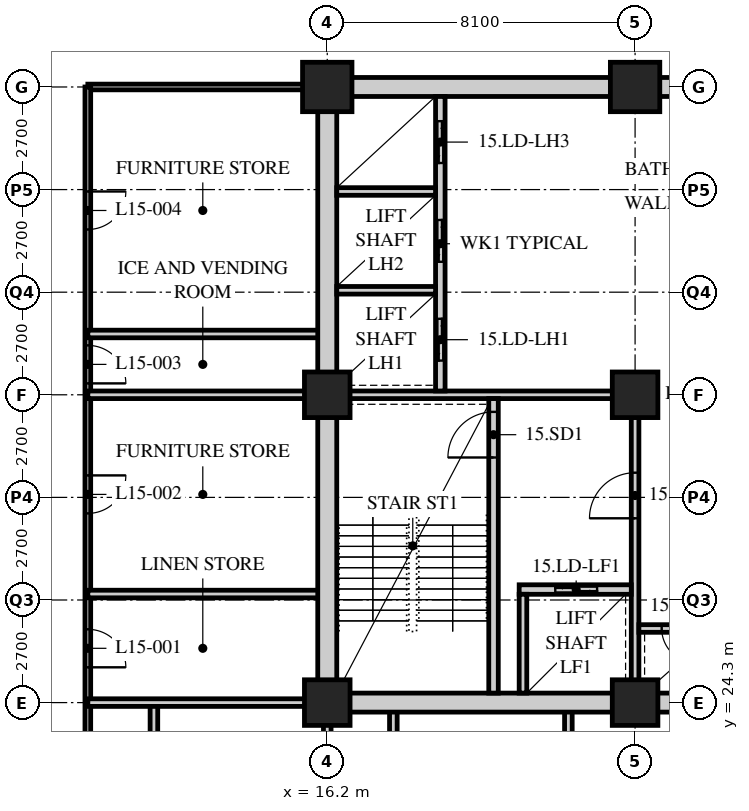
"""IFC4 building model, lengths in metres.
Left out: names, types, materials, properties, quantities, classifications, styles, units other than length and angle.
Written with IfcOpenShell. Run it as: python <this file> out.ifc"""

import sys

from ifc_helpers import new_model, si_unit, direction, frame, frame_2d, origin, origin_2d, place, context, subcontext, project, spatial, rectangle, hollow_rectangle, extrude, element, fill, save


model = new_model("IFC4")
c1 = context("Model", 3, precision=1e-05, world=origin(), true_north=direction((0.0, 1.0)))
c2 = subcontext(c1, "Body", "Model", "MODEL_VIEW")
j1 = project(units=[si_unit("LENGTHUNIT", "METRE"), si_unit("PLANEANGLEUNIT", "RADIAN")], contexts=[c1])
p1 = place(None, origin())
s1 = spatial("IfcSite", under=j1, at=p1, CompositionType="ELEMENT")
p2 = place(p1, origin())
s2 = spatial("IfcBuilding", under=s1, at=p2, CompositionType="ELEMENT")
p3 = place(p2, frame((0.0, 0.0, 63.6)))
s3 = spatial("IfcBuildingStorey", under=s2, at=p3, CompositionType="ELEMENT", Elevation=63.6)
for number, where, z_axis, x_axis in (
    (1, (16.2, 24.3, 0.0), (0.0, 0.0, 1.0), (1.0, 0.0, 0.0)),
    (2, (16.2, 32.4, 0.0), (0.0, 0.0, 1.0), (1.0, 0.0, 0.0)),
):
    element("IfcColumn", number, at=place(p3, frame(where, z_axis=z_axis, x_axis=x_axis)), inside=s3, PredefinedType="COLUMN", context=c2, shape_type="SweptSolid", body=[
        extrude(hollow_rectangle(XDim=1.2, YDim=1.2, WallThickness=0.12, at=origin_2d()), origin(), (0.0, 0.0, 1.0), 3.4),
    ])
p4 = place(p3, frame((16.2, 40.5, 0.0), z_axis=(0.0, 0.0, 1.0), x_axis=(1.0, 0.0, 0.0)))
e3 = element("IfcColumn", 3, at=p4, inside=s3, PredefinedType="COLUMN", context=c2, shape_type="SweptSolid", body=[
    extrude(hollow_rectangle(XDim=1.3, YDim=1.3, WallThickness=0.13, at=origin_2d()), origin(), (0.0, 0.0, 1.0), 3.4),
])
for number, where, z_axis, x_axis in (
    (4, (24.3, 24.3, 0.0), (0.0, 0.0, 1.0), (1.0, 0.0, 0.0)),
    (5, (24.3, 32.4, 0.0), (0.0, 0.0, 1.0), (1.0, 0.0, 0.0)),
):
    element("IfcColumn", number, at=place(p3, frame(where, z_axis=z_axis, x_axis=x_axis)), inside=s3, PredefinedType="COLUMN", context=c2, shape_type="SweptSolid", body=[
        extrude(hollow_rectangle(XDim=1.2, YDim=1.2, WallThickness=0.12, at=origin_2d()), origin(), (0.0, 0.0, 1.0), 3.4),
    ])
p5 = place(p3, frame((24.3, 40.5, 0.0), z_axis=(0.0, 0.0, 1.0), x_axis=(1.0, 0.0, 0.0)))
e6 = element("IfcColumn", 6, at=p5, inside=s3, PredefinedType="COLUMN", context=c2, shape_type="SweptSolid", body=[
    extrude(hollow_rectangle(XDim=1.3, YDim=1.3, WallThickness=0.13, at=origin_2d()), origin(), (0.0, 0.0, 1.0), 3.4),
])
p6 = place(p3, frame((16.0, 40.5, 0.0), z_axis=(0.0, 0.0, 1.0), x_axis=(-1.0, 0.0, 0.0)))
e7 = element("IfcWall", 7, at=p6, inside=s3, PredefinedType="PARTITIONING", context=c2, shape_type="SweptSolid", body=[
    extrude(rectangle(XDim=6.1, YDim=0.15, at=frame_2d((3.05, 0.0))), origin(), (0.0, 0.0, 1.0), 2.578),
])
p7 = place(p3, frame((9.9, 40.5, 0.0), z_axis=(0.0, 0.0, 1.0), x_axis=(0.0, -1.0, 0.0)))
e8 = element("IfcWall", 8, at=p7, inside=s3, PredefinedType="PARTITIONING", context=c2, shape_type="SweptSolid", body=[
    extrude(rectangle(XDim=26.55, YDim=0.15, at=frame_2d((13.275, 0.0))), origin(), (0.0, 0.0, 1.0), 3.19),
])
p8 = place(p7, frame((14.271, 0.0, 0.0)))
e9 = element("IfcOpeningElement", 9, at=p8, cuts=e8, PredefinedType="OPENING", context=c2, shape_type="SweptSolid", body=[
    extrude(rectangle(XDim=1.0, YDim=2.1, at=frame_2d((0.5, 1.05))), frame((0.0, 0.085, 0.0), z_axis=(0.0, -1.0, 0.0), x_axis=(1.0, 0.0, 0.0)), (0.0, 0.0, 1.0), 0.17),
])
p9 = place(p7, frame((10.221, 0.0, 0.0)))
e10 = element("IfcOpeningElement", 10, at=p9, cuts=e8, PredefinedType="OPENING", context=c2, shape_type="SweptSolid", body=[
    extrude(rectangle(XDim=1.0, YDim=2.1, at=frame_2d((0.5, 1.05))), frame((0.0, 0.085, 0.0), z_axis=(0.0, -1.0, 0.0), x_axis=(1.0, 0.0, 0.0)), (0.0, 0.0, 1.0), 0.17),
])
p10 = place(p7, frame((6.8, 0.0, 0.0)))
e11 = element("IfcOpeningElement", 11, at=p10, cuts=e8, PredefinedType="OPENING", context=c2, shape_type="SweptSolid", body=[
    extrude(rectangle(XDim=1.0, YDim=2.1, at=frame_2d((0.5, 1.05))), frame((0.0, 0.085, 0.0), z_axis=(0.0, -1.0, 0.0), x_axis=(1.0, 0.0, 0.0)), (0.0, 0.0, 1.0), 0.17),
])
p11 = place(p7, frame((2.75, 0.0, 0.0)))
e12 = element("IfcOpeningElement", 12, at=p11, cuts=e8, PredefinedType="OPENING", context=c2, shape_type="SweptSolid", body=[
    extrude(rectangle(XDim=1.0, YDim=2.1, at=frame_2d((0.5, 1.05))), frame((0.0, 0.085, 0.0), z_axis=(0.0, -1.0, 0.0), x_axis=(1.0, 0.0, 0.0)), (0.0, 0.0, 1.0), 0.17),
])
p12 = place(p3, frame((9.9, 32.4, 0.0), z_axis=(0.0, 0.0, 1.0), x_axis=(1.0, 0.0, 0.0)))
e13 = element("IfcWall", 13, at=p12, inside=s3, PredefinedType="SOLIDWALL", context=c2, shape_type="SweptSolid", body=[
    extrude(rectangle(XDim=6.3, YDim=0.2, at=frame_2d((3.15, 0.0))), origin(), (0.0, 0.0, 1.0), 2.578),
])
for number, where, z_axis, x_axis in (
    (14, (9.9, 27.157, 0.0), (0.0, 0.0, 1.0), (1.0, 0.0, 0.0)),
    (15, (9.9, 34.0, 0.0), (0.0, 0.0, 1.0), (1.0, 0.0, 0.0)),
):
    element("IfcWall", number, at=place(p3, frame(where, z_axis=z_axis, x_axis=x_axis)), inside=s3, PredefinedType="SOLIDWALL", context=c2, shape_type="SweptSolid", body=[
        extrude(rectangle(XDim=6.3, YDim=0.2, at=frame_2d((3.15, 0.0))), origin(), (0.0, 0.0, 1.0), 3.19),
    ])
p13 = place(p3, frame((16.2, 13.95, 0.0), z_axis=(0.0, 0.0, 1.0), x_axis=(0.0, 1.0, 0.0)))
e16 = element("IfcWall", 16, at=p13, inside=s3, PredefinedType="SOLIDWALL", context=c2, shape_type="SweptSolid", body=[
    extrude(rectangle(XDim=10.35, YDim=0.2, at=frame_2d((5.175, 0.0))), origin(), (0.0, 0.0, 1.0), 2.578),
])
for number, where, z_axis, x_axis in (
    (17, (11.639, 13.95, 0.0), (0.0, 0.0, 1.0), (0.0, 1.0, 0.0)),
    (18, (17.939, 13.95, 0.0), (0.0, 0.0, 1.0), (0.0, 1.0, 0.0)),
    (19, (22.545, 13.95, 0.0), (0.0, 0.0, 1.0), (0.0, 1.0, 0.0)),
):
    element("IfcWall", number, at=place(p3, frame(where, z_axis=z_axis, x_axis=x_axis)), inside=s3, PredefinedType="SOLIDWALL", context=c2, shape_type="SweptSolid", body=[
        extrude(rectangle(XDim=10.35, YDim=0.2, at=frame_2d((5.175, 0.0))), origin(), (0.0, 0.0, 1.0), 3.19),
    ])
p14 = place(p3, frame((9.9, 24.3, 0.0), z_axis=(0.0, 0.0, 1.0), x_axis=(1.0, 0.0, 0.0)))
e20 = element("IfcWall", 20, at=p14, inside=s3, PredefinedType="SOLIDWALL", context=c2, shape_type="SweptSolid", body=[
    extrude(rectangle(XDim=6.3, YDim=0.2, at=frame_2d((3.15, 0.0))), origin(), (0.0, 0.0, 1.0), 2.578),
])
p15 = place(p3, frame((15.95, 24.3, 0.0), z_axis=(0.0, 0.0, 1.0), x_axis=(1.0, 0.0, 0.0)))
e21 = element("IfcWall", 21, at=p15, inside=s3, PredefinedType="SOLIDWALL", context=c2, shape_type="SweptSolid", body=[
    extrude(rectangle(XDim=24.8, YDim=0.5, at=frame_2d((12.4, 0.0))), origin(), (0.0, 0.0, 1.0), 2.54),
])
p16 = place(p15, frame((11.5, 0.0, 0.0)))
e22 = element("IfcOpeningElement", 22, at=p16, cuts=e21, PredefinedType="OPENING", context=c2, shape_type="SweptSolid", body=[
    extrude(rectangle(XDim=1.8, YDim=2.4, at=frame_2d((0.9, 1.2))), frame((0.0, 0.26, 0.0), z_axis=(0.0, -1.0, 0.0), x_axis=(1.0, 0.0, 0.0)), (0.0, 0.0, 1.0), 0.52),
])
p17 = place(p3, frame((15.95, 40.5, 0.0), z_axis=(0.0, 0.0, 1.0), x_axis=(1.0, 0.0, 0.0)))
e23 = element("IfcWall", 23, at=p17, inside=s3, PredefinedType="SOLIDWALL", context=c2, shape_type="SweptSolid", body=[
    extrude(rectangle(XDim=24.8, YDim=0.5, at=frame_2d((12.4, 0.0))), origin(), (0.0, 0.0, 1.0), 2.54),
])
p18 = place(p17, frame((11.5, 0.0, 0.0)))
e24 = element("IfcOpeningElement", 24, at=p18, cuts=e23, PredefinedType="OPENING", context=c2, shape_type="SweptSolid", body=[
    extrude(rectangle(XDim=1.8, YDim=2.4, at=frame_2d((0.9, 1.2))), frame((0.0, 0.26, 0.0), z_axis=(0.0, -1.0, 0.0), x_axis=(1.0, 0.0, 0.0)), (0.0, 0.0, 1.0), 0.52),
])
p19 = place(p3, frame((16.2, 24.55, 0.0), z_axis=(0.0, 0.0, 1.0), x_axis=(0.0, 1.0, 0.0)))
e25 = element("IfcWall", 25, at=p19, inside=s3, PredefinedType="SOLIDWALL", context=c2, shape_type="SweptSolid", body=[
    extrude(rectangle(XDim=15.7, YDim=0.5, at=frame_2d((7.85, 0.0))), origin(), (0.0, 0.0, 1.0), 2.578),
])
p20 = place(p3, frame((16.45, 32.4, 0.0), z_axis=(0.0, 0.0, 1.0), x_axis=(1.0, 0.0, 0.0)))
e26 = element("IfcWall", 26, at=p20, inside=s3, PredefinedType="SOLIDWALL", context=c2, shape_type="SweptSolid", body=[
    extrude(rectangle(XDim=7.95, YDim=0.2, at=frame_2d((3.975, 0.0))), origin(), (0.0, 0.0, 1.0), 2.578),
])
p21 = place(p3, frame((24.3, 24.55, 0.0), z_axis=(0.0, 0.0, 1.0), x_axis=(0.0, 1.0, 0.0)))
e27 = element("IfcWall", 27, at=p21, inside=s3, PredefinedType="SOLIDWALL", context=c2, shape_type="SweptSolid", body=[
    extrude(rectangle(XDim=7.75, YDim=0.2, at=frame_2d((3.875, 0.0))), origin(), (0.0, 0.0, 1.0), 2.578),
])
p22 = place(p21, frame((4.6, 0.0, 0.0)))
e28 = element("IfcOpeningElement", 28, at=p22, cuts=e27, PredefinedType="OPENING", context=c2, shape_type="SweptSolid", body=[
    extrude(rectangle(XDim=1.2, YDim=2.1, at=frame_2d((0.6, 1.05))), frame((0.0, 0.11, 0.0), z_axis=(0.0, -1.0, 0.0), x_axis=(1.0, 0.0, 0.0)), (0.0, 0.0, 1.0), 0.22),
])
p23 = place(p3, frame((20.575, 24.55, 0.0), z_axis=(0.0, 0.0, 1.0), x_axis=(0.0, 1.0, 0.0)))
e29 = element("IfcWall", 29, at=p23, inside=s3, PredefinedType="SOLIDWALL", context=c2, shape_type="SweptSolid", body=[
    extrude(rectangle(XDim=7.75, YDim=0.25, at=frame_2d((3.875, 0.0))), origin(), (0.0, 0.0, 1.0), 3.19),
])
p24 = place(p23, frame((6.2, 0.0, 0.0)))
e30 = element("IfcOpeningElement", 30, at=p24, cuts=e29, PredefinedType="OPENING", context=c2, shape_type="SweptSolid", body=[
    extrude(rectangle(XDim=1.2, YDim=2.1, at=frame_2d((0.6, 1.05))), frame((0.0, 0.135, 0.0), z_axis=(0.0, -1.0, 0.0), x_axis=(1.0, 0.0, 0.0)), (0.0, 0.0, 1.0), 0.27),
])
p25 = place(p3, frame((21.25, 27.275, 0.0), z_axis=(0.0, 0.0, 1.0), x_axis=(1.0, 0.0, 0.0)))
e31 = element("IfcWall", 31, at=p25, inside=s3, PredefinedType="SOLIDWALL", context=c2, shape_type="SweptSolid", body=[
    extrude(rectangle(XDim=2.95, YDim=0.25, at=frame_2d((1.475, 0.0))), origin(), (0.0, 0.0, 1.0), 3.19),
])
p26 = place(p25, frame((0.95, 0.0, 0.0)))
e32 = element("IfcOpeningElement", 32, at=p26, cuts=e31, PredefinedType="OPENING", context=c2, shape_type="SweptSolid", body=[
    extrude(rectangle(XDim=1.1, YDim=2.4, at=frame_2d((0.55, 1.2))), frame((0.0, 0.135, 0.0), z_axis=(0.0, -1.0, 0.0), x_axis=(1.0, 0.0, 0.0)), (0.0, 0.0, 1.0), 0.27),
])
p27 = place(p3, frame((21.35, 24.55, 0.0), z_axis=(0.0, 0.0, 1.0), x_axis=(0.0, 1.0, 0.0)))
e33 = element("IfcWall", 33, at=p27, inside=s3, PredefinedType="SOLIDWALL", context=c2, shape_type="SweptSolid", body=[
    extrude(rectangle(XDim=2.6, YDim=0.2, at=frame_2d((1.3, 0.0))), origin(), (0.0, 0.0, 1.0), 3.19),
])
p28 = place(p3, frame((19.175, 32.5, 0.0), z_axis=(0.0, 0.0, 1.0), x_axis=(0.0, 1.0, 0.0)))
e34 = element("IfcWall", 34, at=p28, inside=s3, PredefinedType="SOLIDWALL", context=c2, shape_type="SweptSolid", body=[
    extrude(rectangle(XDim=7.75, YDim=0.25, at=frame_2d((3.875, 0.0))), origin(), (0.0, 0.0, 1.0), 3.19),
])
p29 = place(p28, frame((0.8, 0.0, 0.0)))
e35 = element("IfcOpeningElement", 35, at=p29, cuts=e34, PredefinedType="OPENING", context=c2, shape_type="SweptSolid", body=[
    extrude(rectangle(XDim=1.1, YDim=2.4, at=frame_2d((0.55, 1.2))), frame((0.0, 0.135, 0.0), z_axis=(0.0, -1.0, 0.0), x_axis=(1.0, 0.0, 0.0)), (0.0, 0.0, 1.0), 0.27),
])
p30 = place(p28, frame((3.4, 0.0, 0.0)))
e36 = element("IfcOpeningElement", 36, at=p30, cuts=e34, PredefinedType="OPENING", context=c2, shape_type="SweptSolid", body=[
    extrude(rectangle(XDim=1.1, YDim=2.4, at=frame_2d((0.55, 1.2))), frame((0.0, 0.135, 0.0), z_axis=(0.0, -1.0, 0.0), x_axis=(1.0, 0.0, 0.0)), (0.0, 0.0, 1.0), 0.27),
])
p31 = place(p28, frame((6.0, 0.0, 0.0)))
e37 = element("IfcOpeningElement", 37, at=p31, cuts=e34, PredefinedType="OPENING", context=c2, shape_type="SweptSolid", body=[
    extrude(rectangle(XDim=1.1, YDim=2.4, at=frame_2d((0.55, 1.2))), frame((0.0, 0.135, 0.0), z_axis=(0.0, -1.0, 0.0), x_axis=(1.0, 0.0, 0.0)), (0.0, 0.0, 1.0), 0.27),
])
for number, where, z_axis, x_axis in (
    (38, (16.45, 35.15, 0.0), (0.0, 0.0, 1.0), (1.0, 0.0, 0.0)),
    (39, (16.45, 37.75, 0.0), (0.0, 0.0, 1.0), (1.0, 0.0, 0.0)),
):
    element("IfcWall", number, at=place(p3, frame(where, z_axis=z_axis, x_axis=x_axis)), inside=s3, PredefinedType="SOLIDWALL", context=c2, shape_type="SweptSolid", body=[
        extrude(rectangle(XDim=2.6, YDim=0.2, at=frame_2d((1.3, 0.0))), origin(), (0.0, 0.0, 1.0), 3.19),
    ])
p32 = place(p3, frame((24.4, 26.25, 0.0), z_axis=(0.0, 0.0, 1.0), x_axis=(1.0, 0.0, 0.0)))
e40 = element("IfcWall", 40, at=p32, inside=s3, PredefinedType="SOLIDWALL", context=c2, shape_type="SweptSolid", body=[
    extrude(rectangle(XDim=2.15, YDim=0.2, at=frame_2d((1.075, 0.0))), origin(), (0.0, 0.0, 1.0), 3.19),
])
p33 = place(p32, frame((0.6, 0.0, 0.0)))
e41 = element("IfcOpeningElement", 41, at=p33, cuts=e40, PredefinedType="OPENING", context=c2, shape_type="SweptSolid", body=[
    extrude(rectangle(XDim=0.9, YDim=2.1, at=frame_2d((0.45, 1.05))), frame((0.0, 0.11, 0.0), z_axis=(0.0, -1.0, 0.0), x_axis=(1.0, 0.0, 0.0)), (0.0, 0.0, 1.0), 0.22),
])
p34 = place(p8, origin())
e42 = element("IfcDoor", 42, at=p34, inside=s3, OperationType="SINGLE_SWING_RIGHT", PredefinedType="DOOR", context=c2, shape_type="SweptSolid", body=[
    extrude(rectangle(XDim=1.0, YDim=2.1, at=frame_2d((0.5, 1.05))), frame((0.0, 0.025, 0.0), z_axis=(0.0, -1.0, 0.0), x_axis=(1.0, 0.0, 0.0)), (0.0, 0.0, 1.0), 0.05),
])
fill(e9, e42)
p35 = place(p9, origin())
e43 = element("IfcDoor", 43, at=p35, inside=s3, OperationType="SINGLE_SWING_LEFT", PredefinedType="DOOR", context=c2, shape_type="SweptSolid", body=[
    extrude(rectangle(XDim=1.0, YDim=2.1, at=frame_2d((0.5, 1.05))), frame((0.0, 0.025, 0.0), z_axis=(0.0, -1.0, 0.0), x_axis=(1.0, 0.0, 0.0)), (0.0, 0.0, 1.0), 0.05),
])
fill(e10, e43)
p36 = place(p10, origin())
e44 = element("IfcDoor", 44, at=p36, inside=s3, OperationType="SINGLE_SWING_RIGHT", PredefinedType="DOOR", context=c2, shape_type="SweptSolid", body=[
    extrude(rectangle(XDim=1.0, YDim=2.1, at=frame_2d((0.5, 1.05))), frame((0.0, 0.025, 0.0), z_axis=(0.0, -1.0, 0.0), x_axis=(1.0, 0.0, 0.0)), (0.0, 0.0, 1.0), 0.05),
])
fill(e11, e44)
p37 = place(p11, origin())
e45 = element("IfcDoor", 45, at=p37, inside=s3, OperationType="SINGLE_SWING_LEFT", PredefinedType="DOOR", context=c2, shape_type="SweptSolid", body=[
    extrude(rectangle(XDim=1.0, YDim=2.1, at=frame_2d((0.5, 1.05))), frame((0.0, 0.025, 0.0), z_axis=(0.0, -1.0, 0.0), x_axis=(1.0, 0.0, 0.0)), (0.0, 0.0, 1.0), 0.05),
])
fill(e12, e45)
p38 = place(p24, origin())
e46 = element("IfcDoor", 46, at=p38, inside=s3, OperationType="SINGLE_SWING_LEFT", PredefinedType="DOOR", context=c2, shape_type="SweptSolid", body=[
    extrude(rectangle(XDim=1.2, YDim=2.1, at=frame_2d((0.6, 1.05))), frame((0.0, 0.025, 0.0), z_axis=(0.0, -1.0, 0.0), x_axis=(1.0, 0.0, 0.0)), (0.0, 0.0, 1.0), 0.05),
])
fill(e30, e46)
p39 = place(p22, origin())
e47 = element("IfcDoor", 47, at=p39, inside=s3, OperationType="SINGLE_SWING_LEFT", PredefinedType="DOOR", context=c2, shape_type="SweptSolid", body=[
    extrude(rectangle(XDim=1.2, YDim=2.1, at=frame_2d((0.6, 1.05))), frame((0.0, 0.025, 0.0), z_axis=(0.0, -1.0, 0.0), x_axis=(1.0, 0.0, 0.0)), (0.0, 0.0, 1.0), 0.05),
])
fill(e28, e47)
p40 = place(p33, origin())
e48 = element("IfcDoor", 48, at=p40, inside=s3, OperationType="SINGLE_SWING_LEFT", PredefinedType="DOOR", context=c2, shape_type="SweptSolid", body=[
    extrude(rectangle(XDim=0.9, YDim=2.1, at=frame_2d((0.45, 1.05))), frame((0.0, 0.025, 0.0), z_axis=(0.0, -1.0, 0.0), x_axis=(1.0, 0.0, 0.0)), (0.0, 0.0, 1.0), 0.05),
])
fill(e41, e48)
p41 = place(p29, origin())
e49 = element("IfcDoor", 49, at=p41, inside=s3, OperationType="DOUBLE_DOOR_SLIDING", PredefinedType="DOOR", context=c2, shape_type="SweptSolid", body=[
    extrude(rectangle(XDim=1.1, YDim=2.4, at=frame_2d((0.55, 1.2))), frame((0.0, 0.025, 0.0), z_axis=(0.0, -1.0, 0.0), x_axis=(1.0, 0.0, 0.0)), (0.0, 0.0, 1.0), 0.05),
])
fill(e35, e49)
p42 = place(p30, origin())
e50 = element("IfcDoor", 50, at=p42, inside=s3, OperationType="DOUBLE_DOOR_SLIDING", PredefinedType="DOOR", context=c2, shape_type="SweptSolid", body=[
    extrude(rectangle(XDim=1.1, YDim=2.4, at=frame_2d((0.55, 1.2))), frame((0.0, 0.025, 0.0), z_axis=(0.0, -1.0, 0.0), x_axis=(1.0, 0.0, 0.0)), (0.0, 0.0, 1.0), 0.05),
])
fill(e36, e50)
p43 = place(p31, origin())
e51 = element("IfcDoor", 51, at=p43, inside=s3, OperationType="DOUBLE_DOOR_SLIDING", PredefinedType="DOOR", context=c2, shape_type="SweptSolid", body=[
    extrude(rectangle(XDim=1.1, YDim=2.4, at=frame_2d((0.55, 1.2))), frame((0.0, 0.025, 0.0), z_axis=(0.0, -1.0, 0.0), x_axis=(1.0, 0.0, 0.0)), (0.0, 0.0, 1.0), 0.05),
])
fill(e37, e51)
p44 = place(p26, origin())
e52 = element("IfcDoor", 52, at=p44, inside=s3, OperationType="DOUBLE_DOOR_SLIDING", PredefinedType="DOOR", context=c2, shape_type="SweptSolid", body=[
    extrude(rectangle(XDim=1.1, YDim=2.4, at=frame_2d((0.55, 1.2))), frame((0.0, 0.025, 0.0), z_axis=(0.0, -1.0, 0.0), x_axis=(1.0, 0.0, 0.0)), (0.0, 0.0, 1.0), 0.05),
])
fill(e32, e52)
save(model, sys.argv[1])
